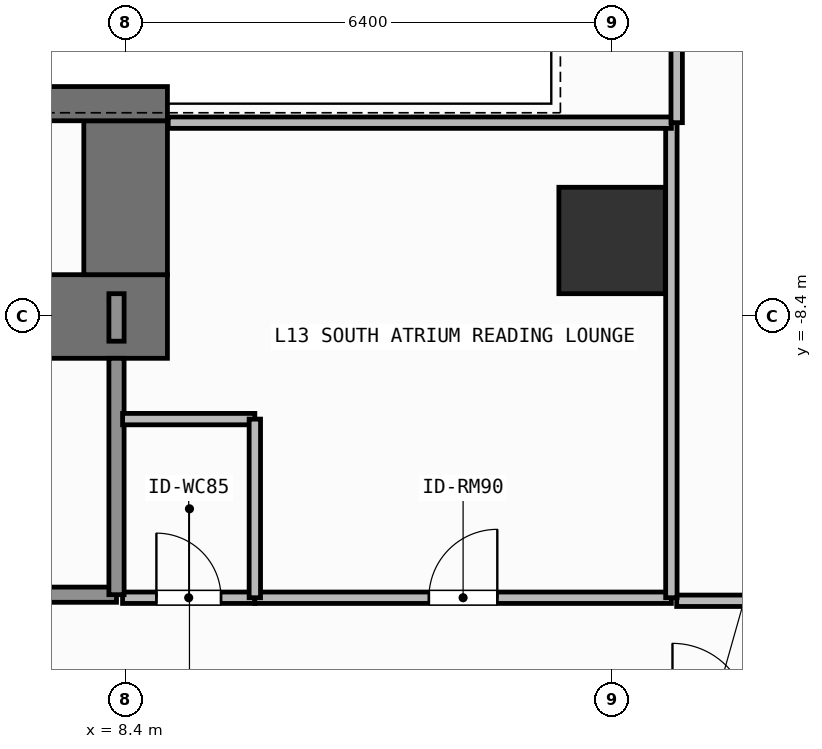
"""IFC4 building model, lengths in metres.
Left out: names, types, materials, properties, quantities, classifications, styles, units other than length and angle.
Written with IfcOpenShell. Run it as: python <this file> out.ifc"""

import sys

from ifc_helpers import new_model, si_unit, direction, frame, frame_2d, origin, origin_2d, place, context, subcontext, project, spatial, rectangle, extrude, element, fill, save


model = new_model("IFC4")
c1 = context("Model", 3, precision=1e-05, world=origin(), true_north=direction((0.0, 1.0)))
c2 = subcontext(c1, "Body", "Model", "MODEL_VIEW")
j1 = project(units=[si_unit("LENGTHUNIT", "METRE"), si_unit("PLANEANGLEUNIT", "RADIAN")], contexts=[c1])
p1 = place(None, origin())
s1 = spatial("IfcSite", under=j1, at=p1, CompositionType="ELEMENT")
p2 = place(p1, origin())
s2 = spatial("IfcBuilding", under=s1, at=p2, CompositionType="ELEMENT")
p3 = place(p2, frame((0.0, 0.0, 50.1)))
s3 = spatial("IfcBuildingStorey", under=s2, at=p3, CompositionType="ELEMENT", Elevation=50.1)
p4 = place(p3, frame((6.12, -8.4, 0.0), z_axis=(0.0, 0.0, 1.0), x_axis=(1.0, 0.0, 0.0)))
e1 = element("IfcWall", 1, at=p4, inside=s3, PredefinedType="SHEAR", context=c2, shape_type="SweptSolid", body=[
    extrude(rectangle(XDim=2.83, YDim=1.1, at=frame_2d((1.415, 0.0))), origin(), (0.0, 0.0, 1.0), 3.9),
])
p5 = place(p3, frame((8.4, -7.85, 0.0), z_axis=(0.0, 0.0, 1.0), x_axis=(0.0, 1.0, 0.0)))
e2 = element("IfcWall", 2, at=p5, inside=s3, PredefinedType="SHEAR", context=c2, shape_type="SweptSolid", body=[
    extrude(rectangle(XDim=2.025, YDim=1.1, at=frame_2d((1.013, 0.0))), origin(), (0.0, 0.0, 1.0), 3.9),
])
p6 = place(p3, frame((3.045, -5.6, 0.0), z_axis=(0.0, 0.0, 1.0), x_axis=(1.0, 0.0, 0.0)))
e3 = element("IfcWall", 3, at=p6, inside=s3, PredefinedType="SHEAR", context=c2, shape_type="SweptSolid", body=[
    extrude(rectangle(XDim=5.905, YDim=0.45, at=frame_2d((2.953, 0.0))), origin(), (0.0, 0.0, 1.0), 3.9),
])
p7 = place(p3, frame((14.8, -7.4, 0.0), z_axis=(0.0, 0.0, 1.0), x_axis=(1.0, 0.0, 0.0)))
e4 = element("IfcColumn", 4, at=p7, inside=s3, PredefinedType="COLUMN", context=c2, shape_type="SweptSolid", body=[
    extrude(rectangle(XDim=1.4, YDim=1.4, at=origin_2d()), origin(), (0.0, 0.0, 1.0), 3.9),
])
p8 = place(p3, frame((4.58, -12.06, 0.0), z_axis=(0.0, 0.0, 1.0), x_axis=(1.0, 0.0, 0.0)))
e5 = element("IfcWall", 5, at=p8, inside=s3, PredefinedType="SOLIDWALL", context=c2, shape_type="SweptSolid", body=[
    extrude(rectangle(XDim=3.7, YDim=0.2, at=frame_2d((1.85, 0.0))), origin(), (0.0, 0.0, 1.0), 3.62),
])
p9 = place(p8, frame((1.212, 0.0, 0.0)))
e6 = element("IfcOpeningElement", 6, at=p9, cuts=e5, PredefinedType="OPENING", context=c2, shape_type="SweptSolid", body=[
    extrude(rectangle(XDim=1.1, YDim=2.15, at=frame_2d((0.55, 1.075))), frame((0.0, 0.11, 0.0), z_axis=(0.0, -1.0, 0.0), x_axis=(1.0, 0.0, 0.0)), (0.0, 0.0, 1.0), 0.22),
])
p10 = place(p3, frame((8.36, -12.1, 0.0), z_axis=(0.0, 0.0, 1.0), x_axis=(1.0, 0.0, 0.0)))
e7 = element("IfcWall", 7, at=p10, inside=s3, PredefinedType="PARTITIONING", context=c2, shape_type="SweptSolid", body=[
    extrude(rectangle(XDim=1.74, YDim=0.15, at=frame_2d((0.87, 0.0))), origin(), (0.0, 0.0, 1.0), 3.62),
])
p11 = place(p10, frame((0.445, 0.0, 0.0)))
e8 = element("IfcOpeningElement", 8, at=p11, cuts=e7, PredefinedType="OPENING", context=c2, shape_type="SweptSolid", body=[
    extrude(rectangle(XDim=0.85, YDim=2.1, at=frame_2d((0.425, 1.05))), frame((0.0, 0.085, 0.0), z_axis=(0.0, -1.0, 0.0), x_axis=(1.0, 0.0, 0.0)), (0.0, 0.0, 1.0), 0.17),
])
p12 = place(p3, frame((10.1, -12.1, 0.0), z_axis=(0.0, 0.0, 1.0), x_axis=(1.0, 0.0, 0.0)))
e9 = element("IfcWall", 9, at=p12, inside=s3, PredefinedType="PARTITIONING", context=c2, shape_type="SweptSolid", body=[
    extrude(rectangle(XDim=5.48, YDim=0.15, at=frame_2d((2.74, 0.0))), origin(), (0.0, 0.0, 1.0), 3.62),
])
p13 = place(p12, frame((2.29, 0.0, 0.0)))
e10 = element("IfcOpeningElement", 10, at=p13, cuts=e9, PredefinedType="OPENING", context=c2, shape_type="SweptSolid", body=[
    extrude(rectangle(XDim=0.9, YDim=2.1, at=frame_2d((0.45, 1.05))), frame((0.0, 0.085, 0.0), z_axis=(0.0, -1.0, 0.0), x_axis=(1.0, 0.0, 0.0)), (0.0, 0.0, 1.0), 0.17),
])
p14 = place(p3, frame((15.65, -12.14, 0.0), z_axis=(0.0, 0.0, 1.0), x_axis=(1.0, 0.0, 0.0)))
e11 = element("IfcWall", 11, at=p14, inside=s3, PredefinedType="PARTITIONING", context=c2, shape_type="SweptSolid", body=[
    extrude(rectangle(XDim=12.27, YDim=0.15, at=frame_2d((6.135, 0.0))), origin(), (0.0, 0.0, 1.0), 3.62),
])
p15 = place(p14, frame((5.15, 0.0, 0.0)))
e12 = element("IfcOpeningElement", 12, at=p15, cuts=e11, PredefinedType="OPENING", context=c2, shape_type="SweptSolid", body=[
    extrude(rectangle(XDim=0.9, YDim=2.1, at=frame_2d((0.45, 1.05))), frame((0.0, 0.085, 0.0), z_axis=(0.0, -1.0, 0.0), x_axis=(1.0, 0.0, 0.0)), (0.0, 0.0, 1.0), 0.17),
])
p16 = place(p3, frame((8.28, -12.06, 0.0), z_axis=(0.0, 0.0, 1.0), x_axis=(0.0, 1.0, 0.0)))
e13 = element("IfcWall", 13, at=p16, inside=s3, PredefinedType="SOLIDWALL", context=c2, shape_type="SweptSolid", body=[
    extrude(rectangle(XDim=3.11, YDim=0.2, at=frame_2d((1.555, 0.0))), origin(), (0.0, 0.0, 1.0), 3.62),
])
p17 = place(p3, frame((8.28, -8.725, 0.0), z_axis=(0.0, 0.0, 1.0), x_axis=(0.0, 1.0, 0.0)))
e14 = element("IfcWall", 14, at=p17, inside=s3, PredefinedType="SOLIDWALL", context=c2, shape_type="SweptSolid", body=[
    extrude(rectangle(XDim=0.625, YDim=0.2, at=frame_2d((0.312, 0.0))), origin(), (0.0, 0.0, 1.0), 3.62),
])
p18 = place(p3, frame((8.36, -9.75, 0.0), z_axis=(0.0, 0.0, 1.0), x_axis=(1.0, 0.0, 0.0)))
e15 = element("IfcWall", 15, at=p18, inside=s3, PredefinedType="PARTITIONING", context=c2, shape_type="SweptSolid", body=[
    extrude(rectangle(XDim=1.74, YDim=0.15, at=frame_2d((0.87, 0.0))), origin(), (0.0, 0.0, 1.0), 3.62),
])
p19 = place(p3, frame((10.1, -12.1, 0.0), z_axis=(0.0, 0.0, 1.0), x_axis=(0.0, 1.0, 0.0)))
e16 = element("IfcWall", 16, at=p19, inside=s3, PredefinedType="PARTITIONING", context=c2, shape_type="SweptSolid", body=[
    extrude(rectangle(XDim=2.35, YDim=0.15, at=frame_2d((1.175, 0.0))), origin(), (0.0, 0.0, 1.0), 3.62),
])
p20 = place(p3, frame((15.58, -12.1, 0.0), z_axis=(0.0, 0.0, 1.0), x_axis=(0.0, 1.0, 0.0)))
e17 = element("IfcWall", 17, at=p20, inside=s3, PredefinedType="PARTITIONING", context=c2, shape_type="SweptSolid", body=[
    extrude(rectangle(XDim=6.25, YDim=0.15, at=frame_2d((3.125, 0.0))), origin(), (0.0, 0.0, 1.0), 3.62),
])
p21 = place(p3, frame((8.96, -5.85, 0.0), z_axis=(0.0, 0.0, 1.0), x_axis=(1.0, 0.0, 0.0)))
e18 = element("IfcWall", 18, at=p21, inside=s3, PredefinedType="PARTITIONING", context=c2, shape_type="SweptSolid", body=[
    extrude(rectangle(XDim=6.62, YDim=0.15, at=frame_2d((3.31, 0.0))), origin(), (0.0, 0.0, 1.0), 3.62),
])
p22 = place(p3, frame((15.65, -5.85, 0.0), z_axis=(0.0, 0.0, 1.0), x_axis=(0.0, 1.0, 0.0)))
e19 = element("IfcWall", 19, at=p22, inside=s3, PredefinedType="PARTITIONING", context=c2, shape_type="SweptSolid", body=[
    extrude(rectangle(XDim=3.1, YDim=0.15, at=frame_2d((1.55, 0.0))), origin(), (0.0, 0.0, 1.0), 3.62),
])
p23 = place(p11, origin())
e20 = element("IfcDoor", 20, at=p23, inside=s3, OperationType="SINGLE_SWING_LEFT", PredefinedType="DOOR", context=c2, shape_type="SweptSolid", body=[
    extrude(rectangle(XDim=0.85, YDim=2.1, at=frame_2d((0.425, 1.05))), frame((0.0, 0.025, 0.0), z_axis=(0.0, -1.0, 0.0), x_axis=(1.0, 0.0, 0.0)), (0.0, 0.0, 1.0), 0.05),
])
fill(e8, e20)
p24 = place(p13, origin())
e21 = element("IfcDoor", 21, at=p24, inside=s3, OperationType="SINGLE_SWING_RIGHT", PredefinedType="DOOR", context=c2, shape_type="SweptSolid", body=[
    extrude(rectangle(XDim=0.9, YDim=2.1, at=frame_2d((0.45, 1.05))), frame((0.0, 0.025, 0.0), z_axis=(0.0, -1.0, 0.0), x_axis=(1.0, 0.0, 0.0)), (0.0, 0.0, 1.0), 0.05),
])
fill(e10, e21)
save(model, sys.argv[1])
